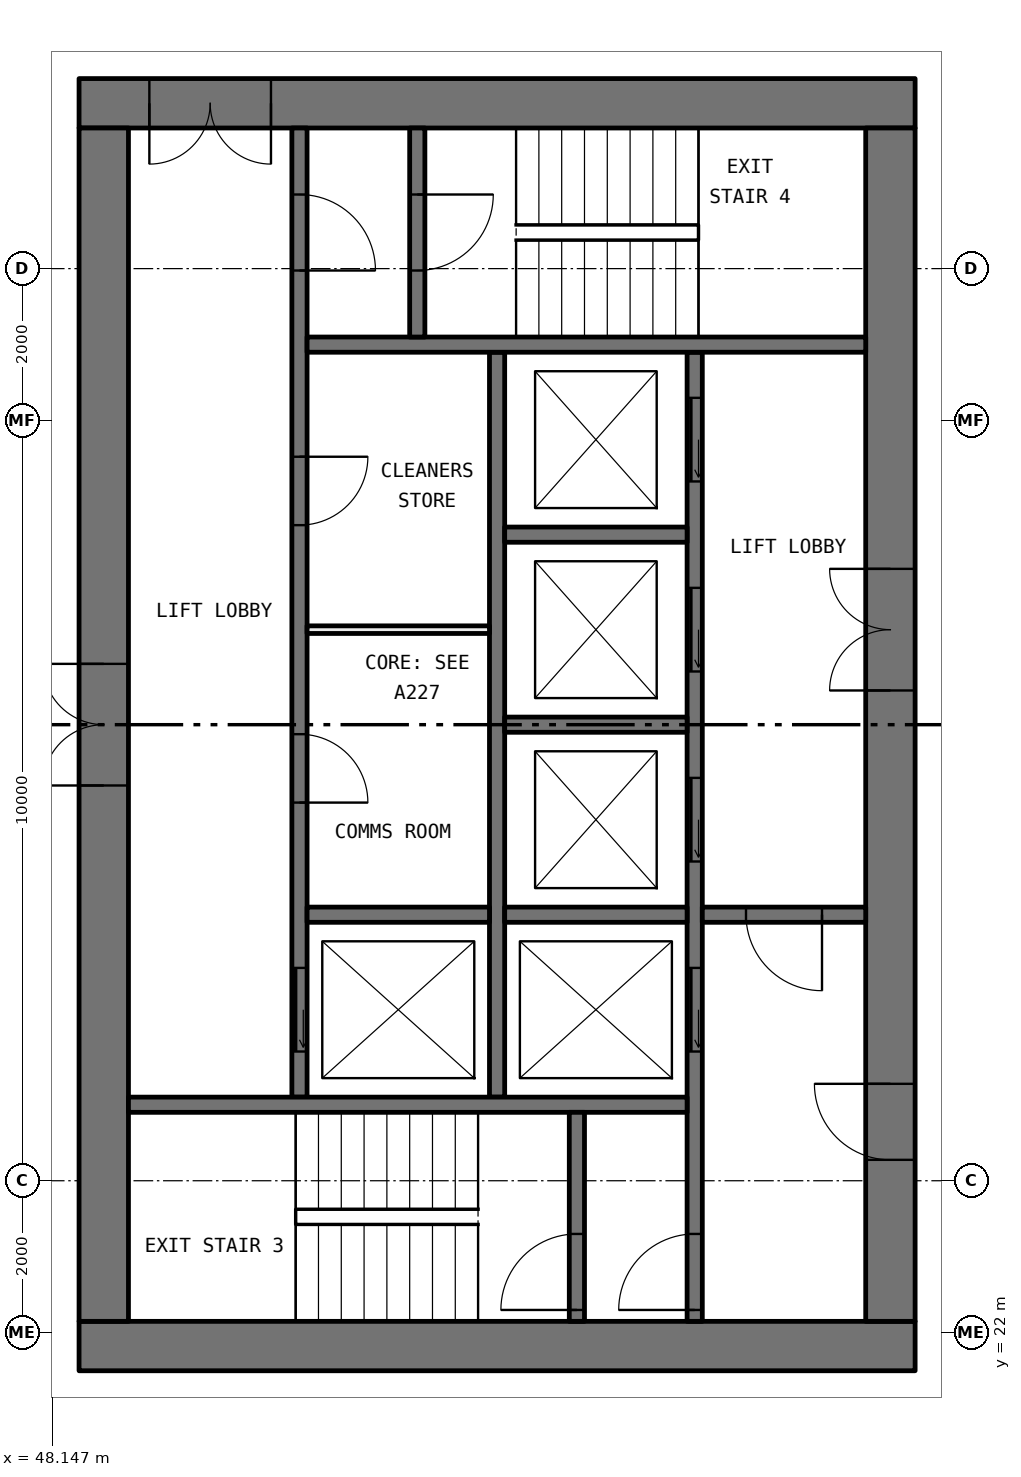
"""IFC4 building model, lengths in metres.
Left out: names, types, materials, properties, quantities, classifications, styles, units other than length and angle.
Written with IfcOpenShell. Run it as: python <this file> out.ifc"""

import sys

from ifc_helpers import new_model, si_unit, direction, frame, frame_2d, origin, place, context, subcontext, project, spatial, rectangle, extrude, element, fill, save


model = new_model("IFC4")
c1 = context("Model", 3, precision=1e-05, world=origin(), true_north=direction((0.0, 1.0)))
c2 = subcontext(c1, "Body", "Model", "MODEL_VIEW")
j1 = project(units=[si_unit("LENGTHUNIT", "METRE"), si_unit("PLANEANGLEUNIT", "RADIAN")], contexts=[c1])
p1 = place(None, origin())
s1 = spatial("IfcSite", under=j1, at=p1, CompositionType="ELEMENT")
p2 = place(p1, origin())
s2 = spatial("IfcBuilding", under=s1, at=p2, CompositionType="ELEMENT")
p3 = place(p2, frame((0.0, 0.0, 103.5)))
s3 = spatial("IfcBuildingStorey", under=s2, at=p3, CompositionType="ELEMENT", Elevation=103.5)
p4 = place(p3, frame((59.5, 21.825, 0.0), z_axis=(0.0, 0.0, 1.0), x_axis=(-1.0, 0.0, 0.0)))
e1 = element("IfcWall", 1, at=p4, inside=s3, PredefinedType="SHEAR", context=c2, shape_type="SweptSolid", body=[
    extrude(rectangle(XDim=11.0, YDim=0.65, at=frame_2d((5.5, 0.0))), origin(), (0.0, 0.0, 1.0), 3.05),
])
p5 = place(p3, frame((59.5, 38.175, 0.0), z_axis=(0.0, 0.0, 1.0), x_axis=(-1.0, 0.0, 0.0)))
e2 = element("IfcWall", 2, at=p5, inside=s3, PredefinedType="SHEAR", context=c2, shape_type="SweptSolid", body=[
    extrude(rectangle(XDim=11.0, YDim=0.65, at=frame_2d((5.5, 0.0))), origin(), (0.0, 0.0, 1.0), 3.05),
])
p6 = place(p5, frame((8.475, 0.0, 0.0)))
e3 = element("IfcOpeningElement", 3, at=p6, cuts=e2, PredefinedType="OPENING", context=c2, shape_type="SweptSolid", body=[
    extrude(rectangle(XDim=1.6, YDim=2.1, at=frame_2d((0.8, 1.05))), frame((0.0, 0.335, 0.0), z_axis=(0.0, -1.0, 0.0), x_axis=(1.0, 0.0, 0.0)), (0.0, 0.0, 1.0), 0.67),
])
p7 = place(p3, frame((59.175, 22.15, 0.0), z_axis=(0.0, 0.0, 1.0), x_axis=(0.0, 1.0, 0.0)))
e4 = element("IfcWall", 4, at=p7, inside=s3, PredefinedType="SHEAR", context=c2, shape_type="SweptSolid", body=[
    extrude(rectangle(XDim=15.7, YDim=0.65, at=frame_2d((7.85, 0.0))), origin(), (0.0, 0.0, 1.0), 3.05),
])
p8 = place(p7, frame((8.3, 0.0, 0.0)))
e5 = element("IfcOpeningElement", 5, at=p8, cuts=e4, PredefinedType="OPENING", context=c2, shape_type="SweptSolid", body=[
    extrude(rectangle(XDim=1.6, YDim=2.1, at=frame_2d((0.8, 1.05))), frame((0.0, 0.335, 0.0), z_axis=(0.0, -1.0, 0.0), x_axis=(1.0, 0.0, 0.0)), (0.0, 0.0, 1.0), 0.67),
])
p9 = place(p7, frame((2.125, 0.0, 0.0)))
e6 = element("IfcOpeningElement", 6, at=p9, cuts=e4, PredefinedType="OPENING", context=c2, shape_type="SweptSolid", body=[
    extrude(rectangle(XDim=1.0, YDim=2.1, at=frame_2d((0.5, 1.05))), frame((0.0, 0.335, 0.0), z_axis=(0.0, -1.0, 0.0), x_axis=(1.0, 0.0, 0.0)), (0.0, 0.0, 1.0), 0.67),
])
p10 = place(p3, frame((48.825, 22.15, 0.0), z_axis=(0.0, 0.0, 1.0), x_axis=(0.0, 1.0, 0.0)))
e7 = element("IfcWall", 7, at=p10, inside=s3, PredefinedType="SHEAR", context=c2, shape_type="SweptSolid", body=[
    extrude(rectangle(XDim=15.7, YDim=0.65, at=frame_2d((7.85, 0.0))), origin(), (0.0, 0.0, 1.0), 3.05),
])
p11 = place(p10, frame((7.05, 0.0, 0.0)))
e8 = element("IfcOpeningElement", 8, at=p11, cuts=e7, PredefinedType="OPENING", context=c2, shape_type="SweptSolid", body=[
    extrude(rectangle(XDim=1.6, YDim=2.1, at=frame_2d((0.8, 1.05))), frame((0.0, 0.335, 0.0), z_axis=(0.0, -1.0, 0.0), x_axis=(1.0, 0.0, 0.0)), (0.0, 0.0, 1.0), 0.67),
])
p12 = place(p3, frame((56.6, 22.15, 0.0), z_axis=(0.0, 0.0, 1.0), x_axis=(0.0, 1.0, 0.0)))
e9 = element("IfcWall", 9, at=p12, inside=s3, PredefinedType="SOLIDWALL", context=c2, shape_type="SweptSolid", body=[
    extrude(rectangle(XDim=12.75, YDim=0.2, at=frame_2d((6.375, 0.0))), origin(), (0.0, 0.0, 1.0), 3.05),
])
p13 = place(p12, frame((3.55, 0.0, 0.0)))
e10 = element("IfcOpeningElement", 10, at=p13, cuts=e9, PredefinedType="OPENING", context=c2, shape_type="SweptSolid", body=[
    extrude(rectangle(XDim=1.1, YDim=2.1, at=frame_2d((0.55, 1.05))), frame((0.0, 0.11, 0.0), z_axis=(0.0, -1.0, 0.0), x_axis=(1.0, 0.0, 0.0)), (0.0, 0.0, 1.0), 0.22),
])
p14 = place(p12, frame((6.05, 0.0, 0.0)))
e11 = element("IfcOpeningElement", 11, at=p14, cuts=e9, PredefinedType="OPENING", context=c2, shape_type="SweptSolid", body=[
    extrude(rectangle(XDim=1.1, YDim=2.1, at=frame_2d((0.55, 1.05))), frame((0.0, 0.11, 0.0), z_axis=(0.0, -1.0, 0.0), x_axis=(1.0, 0.0, 0.0)), (0.0, 0.0, 1.0), 0.22),
])
p15 = place(p12, frame((8.55, 0.0, 0.0)))
e12 = element("IfcOpeningElement", 12, at=p15, cuts=e9, PredefinedType="OPENING", context=c2, shape_type="SweptSolid", body=[
    extrude(rectangle(XDim=1.1, YDim=2.1, at=frame_2d((0.55, 1.05))), frame((0.0, 0.11, 0.0), z_axis=(0.0, -1.0, 0.0), x_axis=(1.0, 0.0, 0.0)), (0.0, 0.0, 1.0), 0.22),
])
p16 = place(p12, frame((11.05, 0.0, 0.0)))
e13 = element("IfcOpeningElement", 13, at=p16, cuts=e9, PredefinedType="OPENING", context=c2, shape_type="SweptSolid", body=[
    extrude(rectangle(XDim=1.1, YDim=2.1, at=frame_2d((0.55, 1.05))), frame((0.0, 0.11, 0.0), z_axis=(0.0, -1.0, 0.0), x_axis=(1.0, 0.0, 0.0)), (0.0, 0.0, 1.0), 0.22),
])
p17 = place(p12, frame((0.15, 0.0, 0.0)))
e14 = element("IfcOpeningElement", 14, at=p17, cuts=e9, PredefinedType="OPENING", context=c2, shape_type="SweptSolid", body=[
    extrude(rectangle(XDim=1.0, YDim=2.1, at=frame_2d((0.5, 1.05))), frame((0.0, 0.11, 0.0), z_axis=(0.0, -1.0, 0.0), x_axis=(1.0, 0.0, 0.0)), (0.0, 0.0, 1.0), 0.22),
])
p18 = place(p3, frame((51.4, 25.1, 0.0), z_axis=(0.0, 0.0, 1.0), x_axis=(0.0, 1.0, 0.0)))
e15 = element("IfcWall", 15, at=p18, inside=s3, PredefinedType="SOLIDWALL", context=c2, shape_type="SweptSolid", body=[
    extrude(rectangle(XDim=12.75, YDim=0.2, at=frame_2d((6.375, 0.0))), origin(), (0.0, 0.0, 1.0), 3.05),
])
p19 = place(p18, frame((0.6, 0.0, 0.0)))
e16 = element("IfcOpeningElement", 16, at=p19, cuts=e15, PredefinedType="OPENING", context=c2, shape_type="SweptSolid", body=[
    extrude(rectangle(XDim=1.1, YDim=2.1, at=frame_2d((0.55, 1.05))), frame((0.0, 0.11, 0.0), z_axis=(0.0, -1.0, 0.0), x_axis=(1.0, 0.0, 0.0)), (0.0, 0.0, 1.0), 0.22),
])
p20 = place(p18, frame((10.875, 0.0, 0.0)))
e17 = element("IfcOpeningElement", 17, at=p20, cuts=e15, PredefinedType="OPENING", context=c2, shape_type="SweptSolid", body=[
    extrude(rectangle(XDim=1.0, YDim=2.1, at=frame_2d((0.5, 1.05))), frame((0.0, 0.11, 0.0), z_axis=(0.0, -1.0, 0.0), x_axis=(1.0, 0.0, 0.0)), (0.0, 0.0, 1.0), 0.22),
])
p21 = place(p18, frame((3.875, 0.0, 0.0)))
e18 = element("IfcOpeningElement", 18, at=p21, cuts=e15, PredefinedType="OPENING", context=c2, shape_type="SweptSolid", body=[
    extrude(rectangle(XDim=0.9, YDim=2.1, at=frame_2d((0.45, 1.05))), frame((0.0, 0.11, 0.0), z_axis=(0.0, -1.0, 0.0), x_axis=(1.0, 0.0, 0.0)), (0.0, 0.0, 1.0), 0.22),
])
p22 = place(p18, frame((7.525, 0.0, 0.0)))
e19 = element("IfcOpeningElement", 19, at=p22, cuts=e15, PredefinedType="OPENING", context=c2, shape_type="SweptSolid", body=[
    extrude(rectangle(XDim=0.9, YDim=2.1, at=frame_2d((0.45, 1.05))), frame((0.0, 0.11, 0.0), z_axis=(0.0, -1.0, 0.0), x_axis=(1.0, 0.0, 0.0)), (0.0, 0.0, 1.0), 0.22),
])
p23 = place(p3, frame((54.0, 25.1, 0.0), z_axis=(0.0, 0.0, 1.0), x_axis=(0.0, 1.0, 0.0)))
e20 = element("IfcWall", 20, at=p23, inside=s3, PredefinedType="SOLIDWALL", context=c2, shape_type="SweptSolid", body=[
    extrude(rectangle(XDim=9.8, YDim=0.2, at=frame_2d((4.9, 0.0))), origin(), (0.0, 0.0, 1.0), 3.05),
])
for number, where, z_axis, x_axis in (
    (21, (56.5, 25.0, 0.0), (0.0, 0.0, 1.0), (-1.0, 0.0, 0.0)),
    (22, (58.85, 35.0, 0.0), (0.0, 0.0, 1.0), (-1.0, 0.0, 0.0)),
):
    element("IfcWall", number, at=place(p3, frame(where, z_axis=z_axis, x_axis=x_axis)), inside=s3, PredefinedType="SOLIDWALL", context=c2, shape_type="SweptSolid", body=[
        extrude(rectangle(XDim=7.35, YDim=0.2, at=frame_2d((3.675, 0.0))), origin(), (0.0, 0.0, 1.0), 3.05),
    ])
p24 = place(p3, frame((58.85, 27.5, 0.0), z_axis=(0.0, 0.0, 1.0), x_axis=(-1.0, 0.0, 0.0)))
e23 = element("IfcWall", 23, at=p24, inside=s3, PredefinedType="SOLIDWALL", context=c2, shape_type="SweptSolid", body=[
    extrude(rectangle(XDim=2.15, YDim=0.2, at=frame_2d((1.075, 0.0))), origin(), (0.0, 0.0, 1.0), 3.05),
])
p25 = place(p24, frame((0.575, 0.0, 0.0)))
e24 = element("IfcOpeningElement", 24, at=p25, cuts=e23, PredefinedType="OPENING", context=c2, shape_type="SweptSolid", body=[
    extrude(rectangle(XDim=1.0, YDim=2.1, at=frame_2d((0.5, 1.05))), frame((0.0, 0.11, 0.0), z_axis=(0.0, -1.0, 0.0), x_axis=(1.0, 0.0, 0.0)), (0.0, 0.0, 1.0), 0.22),
])
p26 = place(p3, frame((55.05, 22.15, 0.0), z_axis=(0.0, 0.0, 1.0), x_axis=(0.0, 1.0, 0.0)))
e25 = element("IfcWall", 25, at=p26, inside=s3, PredefinedType="SOLIDWALL", context=c2, shape_type="SweptSolid", body=[
    extrude(rectangle(XDim=2.75, YDim=0.2, at=frame_2d((1.375, 0.0))), origin(), (0.0, 0.0, 1.0), 3.05),
])
p27 = place(p26, frame((0.15, 0.0, 0.0)))
e26 = element("IfcOpeningElement", 26, at=p27, cuts=e25, PredefinedType="OPENING", context=c2, shape_type="SweptSolid", body=[
    extrude(rectangle(XDim=1.0, YDim=2.1, at=frame_2d((0.5, 1.05))), frame((0.0, 0.11, 0.0), z_axis=(0.0, -1.0, 0.0), x_axis=(1.0, 0.0, 0.0)), (0.0, 0.0, 1.0), 0.22),
])
p28 = place(p3, frame((52.95, 35.1, 0.0), z_axis=(0.0, 0.0, 1.0), x_axis=(0.0, 1.0, 0.0)))
e27 = element("IfcWall", 27, at=p28, inside=s3, PredefinedType="SOLIDWALL", context=c2, shape_type="SweptSolid", body=[
    extrude(rectangle(XDim=2.75, YDim=0.2, at=frame_2d((1.375, 0.0))), origin(), (0.0, 0.0, 1.0), 3.05),
])
p29 = place(p28, frame((0.875, 0.0, 0.0)))
e28 = element("IfcOpeningElement", 28, at=p29, cuts=e27, PredefinedType="OPENING", context=c2, shape_type="SweptSolid", body=[
    extrude(rectangle(XDim=1.0, YDim=2.1, at=frame_2d((0.5, 1.05))), frame((0.0, 0.11, 0.0), z_axis=(0.0, -1.0, 0.0), x_axis=(1.0, 0.0, 0.0)), (0.0, 0.0, 1.0), 0.22),
])
for number, where, z_axis, x_axis in (
    (29, (56.5, 27.5, 0.0), (0.0, 0.0, 1.0), (-1.0, 0.0, 0.0)),
    (30, (56.5, 30.0, 0.0), (0.0, 0.0, 1.0), (-1.0, 0.0, 0.0)),
    (31, (56.5, 32.5, 0.0), (0.0, 0.0, 1.0), (-1.0, 0.0, 0.0)),
    (32, (53.9, 27.5, 0.0), (0.0, 0.0, 1.0), (-1.0, 0.0, 0.0)),
):
    element("IfcWall", number, at=place(p3, frame(where, z_axis=z_axis, x_axis=x_axis)), inside=s3, PredefinedType="SOLIDWALL", context=c2, shape_type="SweptSolid", body=[
        extrude(rectangle(XDim=2.4, YDim=0.2, at=frame_2d((1.2, 0.0))), origin(), (0.0, 0.0, 1.0), 3.05),
    ])
p30 = place(p3, frame((53.9, 31.25, 0.0), z_axis=(0.0, 0.0, 1.0), x_axis=(-1.0, 0.0, 0.0)))
e33 = element("IfcWall", 33, at=p30, inside=s3, PredefinedType="PARTITIONING", context=c2, shape_type="SweptSolid", body=[
    extrude(rectangle(XDim=2.4, YDim=0.1, at=frame_2d((1.2, 0.0))), origin(), (0.0, 0.0, 1.0), 3.05),
])
p31 = place(p19, origin())
e34 = element("IfcDoor", 34, at=p31, inside=s3, OperationType="SLIDING_TO_LEFT", PredefinedType="DOOR", context=c2, shape_type="SweptSolid", body=[
    extrude(rectangle(XDim=1.1, YDim=2.1, at=frame_2d((0.55, 1.05))), frame((0.0, 0.025, 0.0), z_axis=(0.0, -1.0, 0.0), x_axis=(1.0, 0.0, 0.0)), (0.0, 0.0, 1.0), 0.05),
])
fill(e16, e34)
p32 = place(p13, origin())
e35 = element("IfcDoor", 35, at=p32, inside=s3, OperationType="SLIDING_TO_LEFT", PredefinedType="DOOR", context=c2, shape_type="SweptSolid", body=[
    extrude(rectangle(XDim=1.1, YDim=2.1, at=frame_2d((0.55, 1.05))), frame((0.0, 0.025, 0.0), z_axis=(0.0, -1.0, 0.0), x_axis=(1.0, 0.0, 0.0)), (0.0, 0.0, 1.0), 0.05),
])
fill(e10, e35)
p33 = place(p14, origin())
e36 = element("IfcDoor", 36, at=p33, inside=s3, OperationType="SLIDING_TO_LEFT", PredefinedType="DOOR", context=c2, shape_type="SweptSolid", body=[
    extrude(rectangle(XDim=1.1, YDim=2.1, at=frame_2d((0.55, 1.05))), frame((0.0, 0.025, 0.0), z_axis=(0.0, -1.0, 0.0), x_axis=(1.0, 0.0, 0.0)), (0.0, 0.0, 1.0), 0.05),
])
fill(e11, e36)
p34 = place(p15, origin())
e37 = element("IfcDoor", 37, at=p34, inside=s3, OperationType="SLIDING_TO_LEFT", PredefinedType="DOOR", context=c2, shape_type="SweptSolid", body=[
    extrude(rectangle(XDim=1.1, YDim=2.1, at=frame_2d((0.55, 1.05))), frame((0.0, 0.025, 0.0), z_axis=(0.0, -1.0, 0.0), x_axis=(1.0, 0.0, 0.0)), (0.0, 0.0, 1.0), 0.05),
])
fill(e12, e37)
p35 = place(p16, origin())
e38 = element("IfcDoor", 38, at=p35, inside=s3, OperationType="SLIDING_TO_LEFT", PredefinedType="DOOR", context=c2, shape_type="SweptSolid", body=[
    extrude(rectangle(XDim=1.1, YDim=2.1, at=frame_2d((0.55, 1.05))), frame((0.0, 0.025, 0.0), z_axis=(0.0, -1.0, 0.0), x_axis=(1.0, 0.0, 0.0)), (0.0, 0.0, 1.0), 0.05),
])
fill(e13, e38)
p36 = place(p27, origin())
e39 = element("IfcDoor", 39, at=p36, inside=s3, OperationType="SINGLE_SWING_RIGHT", PredefinedType="DOOR", context=c2, shape_type="SweptSolid", body=[
    extrude(rectangle(XDim=1.0, YDim=2.1, at=frame_2d((0.5, 1.05))), frame((0.0, 0.025, 0.0), z_axis=(0.0, -1.0, 0.0), x_axis=(1.0, 0.0, 0.0)), (0.0, 0.0, 1.0), 0.05),
])
fill(e26, e39)
p37 = place(p17, origin())
e40 = element("IfcDoor", 40, at=p37, inside=s3, OperationType="SINGLE_SWING_RIGHT", PredefinedType="DOOR", context=c2, shape_type="SweptSolid", body=[
    extrude(rectangle(XDim=1.0, YDim=2.1, at=frame_2d((0.5, 1.05))), frame((0.0, 0.025, 0.0), z_axis=(0.0, -1.0, 0.0), x_axis=(1.0, 0.0, 0.0)), (0.0, 0.0, 1.0), 0.05),
])
fill(e14, e40)
p38 = place(p20, frame((1.0, 0.0, 0.0), x_axis=(-1.0, 0.0, 0.0)))
e41 = element("IfcDoor", 41, at=p38, inside=s3, OperationType="SINGLE_SWING_LEFT", PredefinedType="DOOR", context=c2, shape_type="SweptSolid", body=[
    extrude(rectangle(XDim=1.0, YDim=2.1, at=frame_2d((0.5, 1.05))), frame((0.0, 0.025, 0.0), z_axis=(0.0, -1.0, 0.0), x_axis=(1.0, 0.0, 0.0)), (0.0, 0.0, 1.0), 0.05),
])
fill(e17, e41)
p39 = place(p29, frame((1.0, 0.0, 0.0), x_axis=(-1.0, 0.0, 0.0)))
e42 = element("IfcDoor", 42, at=p39, inside=s3, OperationType="SINGLE_SWING_RIGHT", PredefinedType="DOOR", context=c2, shape_type="SweptSolid", body=[
    extrude(rectangle(XDim=1.0, YDim=2.1, at=frame_2d((0.5, 1.05))), frame((0.0, 0.025, 0.0), z_axis=(0.0, -1.0, 0.0), x_axis=(1.0, 0.0, 0.0)), (0.0, 0.0, 1.0), 0.05),
])
fill(e28, e42)
p40 = place(p25, origin())
e43 = element("IfcDoor", 43, at=p40, inside=s3, OperationType="SINGLE_SWING_RIGHT", PredefinedType="DOOR", context=c2, shape_type="SweptSolid", body=[
    extrude(rectangle(XDim=1.0, YDim=2.1, at=frame_2d((0.5, 1.05))), frame((0.0, 0.025, 0.0), z_axis=(0.0, -1.0, 0.0), x_axis=(1.0, 0.0, 0.0)), (0.0, 0.0, 1.0), 0.05),
])
fill(e24, e43)
p41 = place(p8, origin())
e44 = element("IfcDoor", 44, at=p41, inside=s3, OperationType="DOUBLE_DOOR_SINGLE_SWING", PredefinedType="DOOR", context=c2, shape_type="SweptSolid", body=[
    extrude(rectangle(XDim=1.6, YDim=2.1, at=frame_2d((0.8, 1.05))), frame((0.0, 0.025, 0.0), z_axis=(0.0, -1.0, 0.0), x_axis=(1.0, 0.0, 0.0)), (0.0, 0.0, 1.0), 0.05),
])
fill(e5, e44)
p42 = place(p9, origin())
e45 = element("IfcDoor", 45, at=p42, inside=s3, OperationType="SINGLE_SWING_LEFT", PredefinedType="DOOR", context=c2, shape_type="SweptSolid", body=[
    extrude(rectangle(XDim=1.0, YDim=2.1, at=frame_2d((0.5, 1.05))), frame((0.0, 0.025, 0.0), z_axis=(0.0, -1.0, 0.0), x_axis=(1.0, 0.0, 0.0)), (0.0, 0.0, 1.0), 0.05),
])
fill(e6, e45)
p43 = place(p6, origin())
e46 = element("IfcDoor", 46, at=p43, inside=s3, OperationType="DOUBLE_DOOR_SINGLE_SWING", PredefinedType="DOOR", context=c2, shape_type="SweptSolid", body=[
    extrude(rectangle(XDim=1.6, YDim=2.1, at=frame_2d((0.8, 1.05))), frame((0.0, 0.025, 0.0), z_axis=(0.0, -1.0, 0.0), x_axis=(1.0, 0.0, 0.0)), (0.0, 0.0, 1.0), 0.05),
])
fill(e3, e46)
p44 = place(p11, origin())
e47 = element("IfcDoor", 47, at=p44, inside=s3, OperationType="DOUBLE_DOOR_SINGLE_SWING", PredefinedType="DOOR", context=c2, shape_type="SweptSolid", body=[
    extrude(rectangle(XDim=1.6, YDim=2.1, at=frame_2d((0.8, 1.05))), frame((0.0, 0.025, 0.0), z_axis=(0.0, -1.0, 0.0), x_axis=(1.0, 0.0, 0.0)), (0.0, 0.0, 1.0), 0.05),
])
fill(e8, e47)
p45 = place(p21, frame((0.9, 0.0, 0.0), x_axis=(-1.0, 0.0, 0.0)))
e48 = element("IfcDoor", 48, at=p45, inside=s3, OperationType="SINGLE_SWING_LEFT", PredefinedType="DOOR", context=c2, shape_type="SweptSolid", body=[
    extrude(rectangle(XDim=0.9, YDim=2.1, at=frame_2d((0.45, 1.05))), frame((0.0, 0.025, 0.0), z_axis=(0.0, -1.0, 0.0), x_axis=(1.0, 0.0, 0.0)), (0.0, 0.0, 1.0), 0.05),
])
fill(e18, e48)
p46 = place(p22, frame((0.9, 0.0, 0.0), x_axis=(-1.0, 0.0, 0.0)))
e49 = element("IfcDoor", 49, at=p46, inside=s3, OperationType="SINGLE_SWING_RIGHT", PredefinedType="DOOR", context=c2, shape_type="SweptSolid", body=[
    extrude(rectangle(XDim=0.9, YDim=2.1, at=frame_2d((0.45, 1.05))), frame((0.0, 0.025, 0.0), z_axis=(0.0, -1.0, 0.0), x_axis=(1.0, 0.0, 0.0)), (0.0, 0.0, 1.0), 0.05),
])
fill(e19, e49)
save(model, sys.argv[1])
